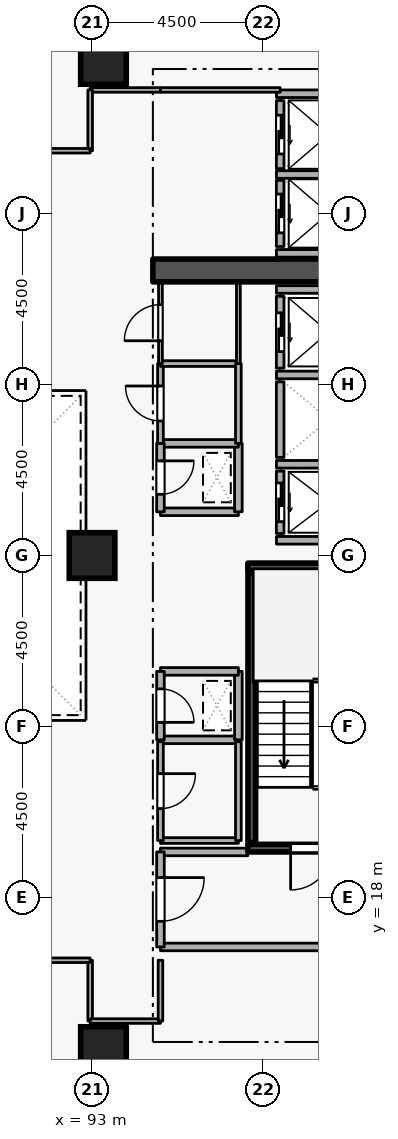
"""IFC4 building model, lengths in metres.
Left out: names, types, materials, properties, quantities, classifications, styles, units other than length and angle.
Written with IfcOpenShell. Run it as: python <this file> out.ifc"""

import sys

from ifc_helpers import new_model, si_unit, direction, frame, frame_2d, origin, origin_2d, place, context, subcontext, project, spatial, rectangle, extrude, element, fill, save


model = new_model("IFC4")
c1 = context("Model", 3, precision=1e-05, world=origin(), true_north=direction((0.0, 1.0)))
c2 = subcontext(c1, "Body", "Model", "MODEL_VIEW")
j1 = project(units=[si_unit("LENGTHUNIT", "METRE"), si_unit("PLANEANGLEUNIT", "RADIAN")], contexts=[c1])
p1 = place(None, origin())
s1 = spatial("IfcSite", under=j1, at=p1, CompositionType="ELEMENT")
p2 = place(p1, origin())
s2 = spatial("IfcBuilding", under=s1, at=p2, CompositionType="ELEMENT")
p3 = place(p2, frame((0.0, 0.0, 80.1)))
s3 = spatial("IfcBuildingStorey", under=s2, at=p3, CompositionType="ELEMENT", Elevation=80.1)
p4 = place(p3, frame((94.6, 34.5, 0.0), z_axis=(0.0, 0.0, 1.0), x_axis=(1.0, 0.0, 0.0)))
e1 = element("IfcWall", 1, at=p4, inside=s3, PredefinedType="SHEAR", context=c2, shape_type="SweptSolid", body=[
    extrude(rectangle(XDim=5.7, YDim=0.6, at=frame_2d((2.85, 0.0))), origin(), (0.0, 0.0, 1.0), 3.6),
])
for number, where, z_axis, x_axis in (
    (2, (93.3, 14.0, 0.0), (0.0, 0.0, 1.0), (1.0, 0.0, 0.0)),
    (3, (93.3, 40.0, 0.0), (0.0, 0.0, 1.0), (1.0, 0.0, 0.0)),
    (4, (93.0, 27.0, 0.0), (0.0, 0.0, 1.0), (1.0, 0.0, 0.0)),
):
    element("IfcColumn", number, at=place(p3, frame(where, z_axis=z_axis, x_axis=x_axis)), inside=s3, PredefinedType="COLUMN", context=c2, shape_type="SweptSolid", body=[
        extrude(rectangle(XDim=1.2, YDim=1.2, at=origin_2d()), origin(), (0.0, 0.0, 1.0), 3.6),
    ])
p5 = place(p3, frame((97.95, 29.22, 0.0), z_axis=(0.0, 0.0, 1.0), x_axis=(0.0, -1.0, 0.0)))
e5 = element("IfcWall", 5, at=p5, inside=s3, PredefinedType="STANDARD", context=c2, shape_type="SweptSolid", body=[
    extrude(rectangle(XDim=1.64, YDim=0.2, at=frame_2d((0.82, 0.0))), origin(), (0.0, 0.0, 1.0), 3.34),
])
p6 = place(p5, frame((0.31, 0.0, 0.0)))
e6 = element("IfcOpeningElement", 6, at=p6, cuts=e5, PredefinedType="OPENING", context=c2, shape_type="SweptSolid", body=[
    extrude(rectangle(XDim=1.02, YDim=2.06, at=frame_2d((0.51, 1.03))), frame((0.0, 0.11, 0.0), z_axis=(0.0, -1.0, 0.0), x_axis=(1.0, 0.0, 0.0)), (0.0, 0.0, 1.0), 0.22),
])
p7 = place(p3, frame((97.95, 31.57, 0.0), z_axis=(0.0, 0.0, 1.0), x_axis=(0.0, -1.0, 0.0)))
e7 = element("IfcWall", 7, at=p7, inside=s3, PredefinedType="STANDARD", context=c2, shape_type="SweptSolid", body=[
    extrude(rectangle(XDim=1.99, YDim=0.2, at=frame_2d((0.995, 0.0))), origin(), (0.0, 0.0, 1.0), 3.34),
])
p8 = place(p3, frame((97.95, 33.82, 0.0), z_axis=(0.0, 0.0, 1.0), x_axis=(0.0, -1.0, 0.0)))
e8 = element("IfcWall", 8, at=p8, inside=s3, PredefinedType="STANDARD", context=c2, shape_type="SweptSolid", body=[
    extrude(rectangle(XDim=1.89, YDim=0.2, at=frame_2d((0.945, 0.0))), origin(), (0.0, 0.0, 1.0), 3.34),
])
p9 = place(p8, frame((0.435, 0.0, 0.0)))
e9 = element("IfcOpeningElement", 9, at=p9, cuts=e8, PredefinedType="OPENING", context=c2, shape_type="SweptSolid", body=[
    extrude(rectangle(XDim=1.02, YDim=2.06, at=frame_2d((0.51, 1.03))), frame((0.0, 0.11, 0.0), z_axis=(0.0, -1.0, 0.0), x_axis=(1.0, 0.0, 0.0)), (0.0, 0.0, 1.0), 0.22),
])
p10 = place(p3, frame((97.95, 36.87, 0.0), z_axis=(0.0, 0.0, 1.0), x_axis=(0.0, -1.0, 0.0)))
e10 = element("IfcWall", 10, at=p10, inside=s3, PredefinedType="STANDARD", context=c2, shape_type="SweptSolid", body=[
    extrude(rectangle(XDim=1.74, YDim=0.2, at=frame_2d((0.87, 0.0))), origin(), (0.0, 0.0, 1.0), 3.34),
])
p11 = place(p10, frame((0.36, 0.0, 0.0)))
e11 = element("IfcOpeningElement", 11, at=p11, cuts=e10, PredefinedType="OPENING", context=c2, shape_type="SweptSolid", body=[
    extrude(rectangle(XDim=1.02, YDim=2.06, at=frame_2d((0.51, 1.03))), frame((0.0, 0.11, 0.0), z_axis=(0.0, -1.0, 0.0), x_axis=(1.0, 0.0, 0.0)), (0.0, 0.0, 1.0), 0.22),
])
p12 = place(p3, frame((97.95, 38.97, 0.0), z_axis=(0.0, 0.0, 1.0), x_axis=(0.0, -1.0, 0.0)))
e12 = element("IfcWall", 12, at=p12, inside=s3, PredefinedType="STANDARD", context=c2, shape_type="SweptSolid", body=[
    extrude(rectangle(XDim=1.79, YDim=0.2, at=frame_2d((0.895, 0.0))), origin(), (0.0, 0.0, 1.0), 3.34),
])
p13 = place(p12, frame((0.385, 0.0, 0.0)))
e13 = element("IfcOpeningElement", 13, at=p13, cuts=e12, PredefinedType="OPENING", context=c2, shape_type="SweptSolid", body=[
    extrude(rectangle(XDim=1.02, YDim=2.06, at=frame_2d((0.51, 1.03))), frame((0.0, 0.11, 0.0), z_axis=(0.0, -1.0, 0.0), x_axis=(1.0, 0.0, 0.0)), (0.0, 0.0, 1.0), 0.22),
])
for number, where, z_axis, x_axis in (
    (14, (97.852, 29.4, 0.0), (0.0, 0.0, 1.0), (1.0, 0.0, 0.0)),
    (15, (97.852, 27.4, 0.0), (0.0, 0.0, 1.0), (1.0, 0.0, 0.0)),
    (16, (97.852, 31.75, 0.0), (0.0, 0.0, 1.0), (1.0, 0.0, 0.0)),
    (17, (97.852, 34.0, 0.0), (0.0, 0.0, 1.0), (1.0, 0.0, 0.0)),
):
    element("IfcWall", number, at=place(p3, frame(where, z_axis=z_axis, x_axis=x_axis)), inside=s3, PredefinedType="STANDARD", context=c2, shape_type="SweptSolid", body=[
        extrude(rectangle(XDim=2.436, YDim=0.2, at=frame_2d((1.218, 0.0))), origin(), (0.0, 0.0, 1.0), 3.34),
    ])
for number, where, z_axis, x_axis in (
    (18, (97.852, 37.025, 0.0), (0.0, 0.0, 1.0), (1.0, 0.0, 0.0)),
    (19, (97.852, 34.95, 0.0), (0.0, 0.0, 1.0), (1.0, 0.0, 0.0)),
):
    element("IfcWall", number, at=place(p3, frame(where, z_axis=z_axis, x_axis=x_axis)), inside=s3, PredefinedType="STANDARD", context=c2, shape_type="SweptSolid", body=[
        extrude(rectangle(XDim=2.746, YDim=0.2, at=frame_2d((1.373, 0.0))), origin(), (0.0, 0.0, 1.0), 3.34),
    ])
p14 = place(p3, frame((97.852, 39.15, 0.0), z_axis=(0.0, 0.0, 1.0), x_axis=(1.0, 0.0, 0.0)))
e20 = element("IfcWall", 20, at=p14, inside=s3, PredefinedType="STANDARD", context=c2, shape_type="SweptSolid", body=[
    extrude(rectangle(XDim=2.636, YDim=0.2, at=frame_2d((1.318, 0.0))), origin(), (0.0, 0.0, 1.0), 3.34),
])
p15 = place(p3, frame((100.45, 19.3, 0.0), z_axis=(0.0, 0.0, 1.0), x_axis=(-1.0, 0.0, 0.0)))
e21 = element("IfcWall", 21, at=p15, inside=s3, PredefinedType="SHEAR", context=c2, shape_type="SweptSolid", body=[
    extrude(rectangle(XDim=3.35, YDim=0.2, at=frame_2d((1.675, 0.0))), origin(), (0.0, 0.0, 1.0), 3.6),
])
p16 = place(p15, frame((1.125, 0.0, 0.0)))
e22 = element("IfcOpeningElement", 22, at=p16, cuts=e21, PredefinedType="OPENING", context=c2, shape_type="SweptSolid", body=[
    extrude(rectangle(XDim=1.1, YDim=2.1, at=frame_2d((0.55, 1.05))), frame((0.0, 0.11, 0.0), z_axis=(0.0, -1.0, 0.0), x_axis=(1.0, 0.0, 0.0)), (0.0, 0.0, 1.0), 0.22),
])
p17 = place(p3, frame((97.1, 26.7, 0.0), z_axis=(0.0, 0.0, 1.0), x_axis=(1.0, 0.0, 0.0)))
e23 = element("IfcWall", 23, at=p17, inside=s3, PredefinedType="SHEAR", context=c2, shape_type="SweptSolid", body=[
    extrude(rectangle(XDim=3.35, YDim=0.2, at=frame_2d((1.675, 0.0))), origin(), (0.0, 0.0, 1.0), 3.6),
])
p18 = place(p3, frame((97.203, 26.55, 0.0), z_axis=(0.0, 0.0, 1.0), x_axis=(0.0, -1.0, 0.0)))
e24 = element("IfcWall", 24, at=p18, inside=s3, PredefinedType="SHEAR", context=c2, shape_type="SweptSolid", body=[
    extrude(rectangle(XDim=7.1, YDim=0.2, at=frame_2d((3.55, 0.0))), origin(), (0.0, 0.0, 1.0), 3.6),
])
p19 = place(p3, frame((94.8, 16.7, 0.0), z_axis=(0.0, 0.0, 1.0), x_axis=(1.0, 0.0, 0.0)))
e25 = element("IfcWall", 25, at=p19, inside=s3, PredefinedType="STANDARD", context=c2, shape_type="SweptSolid", body=[
    extrude(rectangle(XDim=5.7, YDim=0.2, at=frame_2d((2.85, 0.0))), origin(), (0.0, 0.0, 1.0), 3.34),
])
p20 = place(p3, frame((97.1, 19.2, 0.0), z_axis=(0.0, 0.0, 1.0), x_axis=(-1.0, 0.0, 0.0)))
e26 = element("IfcWall", 26, at=p20, inside=s3, PredefinedType="STANDARD", context=c2, shape_type="SweptSolid", body=[
    extrude(rectangle(XDim=2.3, YDim=0.2, at=frame_2d((1.15, 0.0))), origin(), (0.0, 0.0, 1.0), 2.545),
])
p21 = place(p3, frame((94.8, 19.2, 0.0), z_axis=(0.0, 0.0, 1.0), x_axis=(0.0, -1.0, 0.0)))
e27 = element("IfcWall", 27, at=p21, inside=s3, PredefinedType="STANDARD", context=c2, shape_type="SweptSolid", body=[
    extrude(rectangle(XDim=2.5, YDim=0.2, at=frame_2d((1.25, 0.0))), origin(), (0.0, 0.0, 1.0), 3.34),
])
p22 = place(p21, frame((0.675, 0.0, 0.0)))
e28 = element("IfcOpeningElement", 28, at=p22, cuts=e27, PredefinedType="OPENING", context=c2, shape_type="SweptSolid", body=[
    extrude(rectangle(XDim=1.15, YDim=2.1, at=frame_2d((0.575, 1.05))), frame((0.0, 0.11, 0.0), z_axis=(0.0, -1.0, 0.0), x_axis=(1.0, 0.0, 0.0)), (0.0, 0.0, 1.0), 0.22),
])
p23 = place(p3, frame((94.8, 28.15, 0.0), z_axis=(0.0, 0.0, 1.0), x_axis=(1.0, 0.0, 0.0)))
e29 = element("IfcWall", 29, at=p23, inside=s3, PredefinedType="STANDARD", context=c2, shape_type="SweptSolid", body=[
    extrude(rectangle(XDim=2.05, YDim=0.2, at=frame_2d((1.025, 0.0))), origin(), (0.0, 0.0, 1.0), 3.34),
])
p24 = place(p3, frame((96.85, 28.15, 0.0), z_axis=(0.0, 0.0, 1.0), x_axis=(0.0, 1.0, 0.0)))
e30 = element("IfcWall", 30, at=p24, inside=s3, PredefinedType="STANDARD", context=c2, shape_type="SweptSolid", body=[
    extrude(rectangle(XDim=1.8, YDim=0.2, at=frame_2d((0.9, 0.0))), origin(), (0.0, 0.0, 1.0), 3.34),
])
p25 = place(p3, frame((96.85, 29.95, 0.0), z_axis=(0.0, 0.0, 1.0), x_axis=(-1.0, 0.0, 0.0)))
e31 = element("IfcWall", 31, at=p25, inside=s3, PredefinedType="STANDARD", context=c2, shape_type="SweptSolid", body=[
    extrude(rectangle(XDim=2.05, YDim=0.2, at=frame_2d((1.025, 0.0))), origin(), (0.0, 0.0, 1.0), 3.34),
])
p26 = place(p3, frame((94.8, 29.95, 0.0), z_axis=(0.0, 0.0, 1.0), x_axis=(0.0, -1.0, 0.0)))
e32 = element("IfcWall", 32, at=p26, inside=s3, PredefinedType="STANDARD", context=c2, shape_type="SweptSolid", body=[
    extrude(rectangle(XDim=1.8, YDim=0.2, at=frame_2d((0.9, 0.0))), origin(), (0.0, 0.0, 1.0), 3.34),
])
p27 = place(p26, frame((0.46, 0.0, 0.0)))
e33 = element("IfcOpeningElement", 33, at=p27, cuts=e32, PredefinedType="OPENING", context=c2, shape_type="SweptSolid", body=[
    extrude(rectangle(XDim=0.88, YDim=2.04, at=frame_2d((0.44, 1.02))), frame((0.0, 0.11, 0.0), z_axis=(0.0, -1.0, 0.0), x_axis=(1.0, 0.0, 0.0)), (0.0, 0.0, 1.0), 0.22),
])
p28 = place(p3, frame((94.8, 22.15, 0.0), z_axis=(0.0, 0.0, 1.0), x_axis=(1.0, 0.0, 0.0)))
e34 = element("IfcWall", 34, at=p28, inside=s3, PredefinedType="STANDARD", context=c2, shape_type="SweptSolid", body=[
    extrude(rectangle(XDim=2.05, YDim=0.2, at=frame_2d((1.025, 0.0))), origin(), (0.0, 0.0, 1.0), 3.34),
])
p29 = place(p3, frame((96.85, 22.15, 0.0), z_axis=(0.0, 0.0, 1.0), x_axis=(0.0, 1.0, 0.0)))
e35 = element("IfcWall", 35, at=p29, inside=s3, PredefinedType="STANDARD", context=c2, shape_type="SweptSolid", body=[
    extrude(rectangle(XDim=1.8, YDim=0.2, at=frame_2d((0.9, 0.0))), origin(), (0.0, 0.0, 1.0), 3.34),
])
p30 = place(p3, frame((96.85, 23.95, 0.0), z_axis=(0.0, 0.0, 1.0), x_axis=(-1.0, 0.0, 0.0)))
e36 = element("IfcWall", 36, at=p30, inside=s3, PredefinedType="STANDARD", context=c2, shape_type="SweptSolid", body=[
    extrude(rectangle(XDim=2.05, YDim=0.2, at=frame_2d((1.025, 0.0))), origin(), (0.0, 0.0, 1.0), 3.34),
])
p31 = place(p3, frame((94.8, 23.95, 0.0), z_axis=(0.0, 0.0, 1.0), x_axis=(0.0, -1.0, 0.0)))
e37 = element("IfcWall", 37, at=p31, inside=s3, PredefinedType="STANDARD", context=c2, shape_type="SweptSolid", body=[
    extrude(rectangle(XDim=1.8, YDim=0.2, at=frame_2d((0.9, 0.0))), origin(), (0.0, 0.0, 1.0), 3.34),
])
p32 = place(p31, frame((0.46, 0.0, 0.0)))
e38 = element("IfcOpeningElement", 38, at=p32, cuts=e37, PredefinedType="OPENING", context=c2, shape_type="SweptSolid", body=[
    extrude(rectangle(XDim=0.88, YDim=2.04, at=frame_2d((0.44, 1.02))), frame((0.0, 0.11, 0.0), z_axis=(0.0, -1.0, 0.0), x_axis=(1.0, 0.0, 0.0)), (0.0, 0.0, 1.0), 0.22),
])
p33 = place(p3, frame((94.8, 19.5, 0.0), z_axis=(0.0, 0.0, 1.0), x_axis=(1.0, 0.0, 0.0)))
e39 = element("IfcWall", 39, at=p33, inside=s3, PredefinedType="PARTITIONING", context=c2, shape_type="SweptSolid", body=[
    extrude(rectangle(XDim=2.05, YDim=0.15, at=frame_2d((1.025, 0.0))), origin(), (0.0, 0.0, 1.0), 2.545),
])
p34 = place(p3, frame((96.85, 19.5, 0.0), z_axis=(0.0, 0.0, 1.0), x_axis=(0.0, 1.0, 0.0)))
e40 = element("IfcWall", 40, at=p34, inside=s3, PredefinedType="PARTITIONING", context=c2, shape_type="SweptSolid", body=[
    extrude(rectangle(XDim=2.6, YDim=0.15, at=frame_2d((1.3, 0.0))), origin(), (0.0, 0.0, 1.0), 3.34),
])
p35 = place(p3, frame((94.8, 22.1, 0.0), z_axis=(0.0, 0.0, 1.0), x_axis=(0.0, -1.0, 0.0)))
e41 = element("IfcWall", 41, at=p35, inside=s3, PredefinedType="PARTITIONING", context=c2, shape_type="SweptSolid", body=[
    extrude(rectangle(XDim=2.6, YDim=0.15, at=frame_2d((1.3, 0.0))), origin(), (0.0, 0.0, 1.0), 3.34),
])
p36 = place(p35, frame((0.84, 0.0, 0.0)))
e42 = element("IfcOpeningElement", 42, at=p36, cuts=e41, PredefinedType="OPENING", context=c2, shape_type="SweptSolid", body=[
    extrude(rectangle(XDim=0.92, YDim=2.08, at=frame_2d((0.46, 1.04))), frame((0.0, 0.085, 0.0), z_axis=(0.0, -1.0, 0.0), x_axis=(1.0, 0.0, 0.0)), (0.0, 0.0, 1.0), 0.17),
])
p37 = place(p3, frame((94.8, 29.95, 0.0), z_axis=(0.0, 0.0, 1.0), x_axis=(0.0, 1.0, 0.0)))
e43 = element("IfcWall", 43, at=p37, inside=s3, PredefinedType="PARTITIONING", context=c2, shape_type="SweptSolid", body=[
    extrude(rectangle(XDim=2.1, YDim=0.15, at=frame_2d((1.05, 0.0))), origin(), (0.0, 0.0, 1.0), 3.34),
])
p38 = place(p37, frame((0.59, 0.0, 0.0)))
e44 = element("IfcOpeningElement", 44, at=p38, cuts=e43, PredefinedType="OPENING", context=c2, shape_type="SweptSolid", body=[
    extrude(rectangle(XDim=0.92, YDim=2.08, at=frame_2d((0.46, 1.04))), frame((0.0, 0.085, 0.0), z_axis=(0.0, -1.0, 0.0), x_axis=(1.0, 0.0, 0.0)), (0.0, 0.0, 1.0), 0.17),
])
p39 = place(p3, frame((94.8, 32.05, 0.0), z_axis=(0.0, 0.0, 1.0), x_axis=(1.0, 0.0, 0.0)))
e45 = element("IfcWall", 45, at=p39, inside=s3, PredefinedType="PARTITIONING", context=c2, shape_type="SweptSolid", body=[
    extrude(rectangle(XDim=2.05, YDim=0.15, at=frame_2d((1.025, 0.0))), origin(), (0.0, 0.0, 1.0), 3.34),
])
p40 = place(p3, frame((96.85, 32.05, 0.0), z_axis=(0.0, 0.0, 1.0), x_axis=(0.0, -1.0, 0.0)))
e46 = element("IfcWall", 46, at=p40, inside=s3, PredefinedType="PARTITIONING", context=c2, shape_type="SweptSolid", body=[
    extrude(rectangle(XDim=2.1, YDim=0.15, at=frame_2d((1.05, 0.0))), origin(), (0.0, 0.0, 1.0), 3.34),
])
p41 = place(p3, frame((94.8, 32.05, 0.0), z_axis=(0.0, 0.0, 1.0), x_axis=(0.0, 1.0, 0.0)))
e47 = element("IfcWall", 47, at=p41, inside=s3, PredefinedType="PARTITIONING", context=c2, shape_type="SweptSolid", body=[
    extrude(rectangle(XDim=2.15, YDim=0.1, at=frame_2d((1.075, 0.0))), origin(), (0.0, 0.0, 1.0), 3.34),
])
p42 = place(p41, frame((0.6, 0.0, 0.0)))
e48 = element("IfcOpeningElement", 48, at=p42, cuts=e47, PredefinedType="OPENING", context=c2, shape_type="SweptSolid", body=[
    extrude(rectangle(XDim=0.95, YDim=2.1, at=frame_2d((0.475, 1.05))), frame((0.0, 0.06, 0.0), z_axis=(0.0, -1.0, 0.0), x_axis=(1.0, 0.0, 0.0)), (0.0, 0.0, 1.0), 0.12),
])
p43 = place(p3, frame((96.85, 34.2, 0.0), z_axis=(0.0, 0.0, 1.0), x_axis=(0.0, -1.0, 0.0)))
e49 = element("IfcWall", 49, at=p43, inside=s3, PredefinedType="PARTITIONING", context=c2, shape_type="SweptSolid", body=[
    extrude(rectangle(XDim=2.15, YDim=0.1, at=frame_2d((1.075, 0.0))), origin(), (0.0, 0.0, 1.0), 3.34),
])
p44 = place(p3, frame((92.95, 16.35, 0.0), z_axis=(0.0, 0.0, 1.0), x_axis=(0.0, -1.0, 0.0)))
e50 = element("IfcWall", 50, at=p44, inside=s3, PredefinedType="PARTITIONING", context=c2, shape_type="SweptSolid", body=[
    extrude(rectangle(XDim=1.6, YDim=0.12, at=frame_2d((0.8, 0.0))), origin(), (0.0, 0.0, 1.0), 3.34),
])
p45 = place(p3, frame((92.95, 14.75, 0.0), z_axis=(0.0, 0.0, 1.0), x_axis=(1.0, 0.0, 0.0)))
e51 = element("IfcWall", 51, at=p45, inside=s3, PredefinedType="PARTITIONING", context=c2, shape_type="SweptSolid", body=[
    extrude(rectangle(XDim=1.85, YDim=0.12, at=frame_2d((0.925, 0.0))), origin(), (0.0, 0.0, 1.0), 3.34),
])
p46 = place(p3, frame((94.8, 14.75, 0.0), z_axis=(0.0, 0.0, 1.0), x_axis=(0.0, 1.0, 0.0)))
e52 = element("IfcWall", 52, at=p46, inside=s3, PredefinedType="PARTITIONING", context=c2, shape_type="SweptSolid", body=[
    extrude(rectangle(XDim=1.6, YDim=0.12, at=frame_2d((0.8, 0.0))), origin(), (0.0, 0.0, 1.0), 3.34),
])
p47 = place(p3, frame((88.5, 16.35, 0.0), z_axis=(0.0, 0.0, 1.0), x_axis=(1.0, 0.0, 0.0)))
e53 = element("IfcWall", 53, at=p47, inside=s3, PredefinedType="PARTITIONING", context=c2, shape_type="SweptSolid", body=[
    extrude(rectangle(XDim=4.45, YDim=0.12, at=frame_2d((2.225, 0.0))), origin(), (0.0, 0.0, 1.0), 3.34),
])
p48 = place(p47, frame((1.7, 0.0, 0.0)))
e54 = element("IfcOpeningElement", 54, at=p48, cuts=e53, PredefinedType="OPENING", context=c2, shape_type="SweptSolid", body=[
    extrude(rectangle(XDim=1.05, YDim=2.1, at=frame_2d((0.525, 1.05))), frame((0.0, 0.07, 0.0), z_axis=(0.0, -1.0, 0.0), x_axis=(1.0, 0.0, 0.0)), (0.0, 0.0, 1.0), 0.14),
])
p49 = place(p3, frame((97.95, 39.25, 0.0), z_axis=(0.0, 0.0, 1.0), x_axis=(-1.0, 0.0, 0.0)))
e55 = element("IfcWall", 55, at=p49, inside=s3, PredefinedType="PARTITIONING", context=c2, shape_type="SweptSolid", body=[
    extrude(rectangle(XDim=3.15, YDim=0.12, at=frame_2d((1.575, 0.0))), origin(), (0.0, 0.0, 1.0), 3.34),
])
p50 = place(p3, frame((94.8, 39.25, 0.0), z_axis=(0.0, 0.0, 1.0), x_axis=(-1.0, 0.0, 0.0)))
e56 = element("IfcWall", 56, at=p50, inside=s3, PredefinedType="PARTITIONING", context=c2, shape_type="SweptSolid", body=[
    extrude(rectangle(XDim=1.85, YDim=0.12, at=frame_2d((0.925, 0.0))), origin(), (0.0, 0.0, 1.0), 3.34),
])
p51 = place(p3, frame((92.95, 39.25, 0.0), z_axis=(0.0, 0.0, 1.0), x_axis=(0.0, -1.0, 0.0)))
e57 = element("IfcWall", 57, at=p51, inside=s3, PredefinedType="PARTITIONING", context=c2, shape_type="SweptSolid", body=[
    extrude(rectangle(XDim=1.6, YDim=0.12, at=frame_2d((0.8, 0.0))), origin(), (0.0, 0.0, 1.0), 3.34),
])
p52 = place(p3, frame((92.95, 37.65, 0.0), z_axis=(0.0, 0.0, 1.0), x_axis=(-1.0, 0.0, 0.0)))
e58 = element("IfcWall", 58, at=p52, inside=s3, PredefinedType="PARTITIONING", context=c2, shape_type="SweptSolid", body=[
    extrude(rectangle(XDim=4.45, YDim=0.12, at=frame_2d((2.225, 0.0))), origin(), (0.0, 0.0, 1.0), 3.34),
])
p53 = place(p52, frame((1.7, 0.0, 0.0)))
e59 = element("IfcOpeningElement", 59, at=p53, cuts=e58, PredefinedType="OPENING", context=c2, shape_type="SweptSolid", body=[
    extrude(rectangle(XDim=1.05, YDim=2.1, at=frame_2d((0.525, 1.05))), frame((0.0, 0.07, 0.0), z_axis=(0.0, -1.0, 0.0), x_axis=(1.0, 0.0, 0.0)), (0.0, 0.0, 1.0), 0.14),
])
p54 = place(p6, origin())
e60 = element("IfcDoor", 60, at=p54, inside=s3, OperationType="SLIDING_TO_LEFT", PredefinedType="DOOR", context=c2, shape_type="SweptSolid", body=[
    extrude(rectangle(XDim=1.02, YDim=2.06, at=frame_2d((0.51, 1.03))), frame((0.0, 0.025, 0.0), z_axis=(0.0, -1.0, 0.0), x_axis=(1.0, 0.0, 0.0)), (0.0, 0.0, 1.0), 0.05),
])
fill(e6, e60)
p55 = place(p9, origin())
e61 = element("IfcDoor", 61, at=p55, inside=s3, OperationType="SLIDING_TO_LEFT", PredefinedType="DOOR", context=c2, shape_type="SweptSolid", body=[
    extrude(rectangle(XDim=1.02, YDim=2.06, at=frame_2d((0.51, 1.03))), frame((0.0, 0.025, 0.0), z_axis=(0.0, -1.0, 0.0), x_axis=(1.0, 0.0, 0.0)), (0.0, 0.0, 1.0), 0.05),
])
fill(e9, e61)
p56 = place(p11, origin())
e62 = element("IfcDoor", 62, at=p56, inside=s3, OperationType="SLIDING_TO_LEFT", PredefinedType="DOOR", context=c2, shape_type="SweptSolid", body=[
    extrude(rectangle(XDim=1.02, YDim=2.06, at=frame_2d((0.51, 1.03))), frame((0.0, 0.025, 0.0), z_axis=(0.0, -1.0, 0.0), x_axis=(1.0, 0.0, 0.0)), (0.0, 0.0, 1.0), 0.05),
])
fill(e11, e62)
p57 = place(p13, origin())
e63 = element("IfcDoor", 63, at=p57, inside=s3, OperationType="SLIDING_TO_LEFT", PredefinedType="DOOR", context=c2, shape_type="SweptSolid", body=[
    extrude(rectangle(XDim=1.02, YDim=2.06, at=frame_2d((0.51, 1.03))), frame((0.0, 0.025, 0.0), z_axis=(0.0, -1.0, 0.0), x_axis=(1.0, 0.0, 0.0)), (0.0, 0.0, 1.0), 0.05),
])
fill(e13, e63)
p58 = place(p16, origin())
e64 = element("IfcDoor", 64, at=p58, inside=s3, OperationType="SINGLE_SWING_RIGHT", PredefinedType="DOOR", context=c2, shape_type="SweptSolid", body=[
    extrude(rectangle(XDim=1.1, YDim=2.1, at=frame_2d((0.55, 1.05))), frame((0.0, 0.025, 0.0), z_axis=(0.0, -1.0, 0.0), x_axis=(1.0, 0.0, 0.0)), (0.0, 0.0, 1.0), 0.05),
])
fill(e22, e64)
p59 = place(p22, origin())
e65 = element("IfcDoor", 65, at=p59, inside=s3, OperationType="SINGLE_SWING_LEFT", PredefinedType="DOOR", context=c2, shape_type="SweptSolid", body=[
    extrude(rectangle(XDim=1.15, YDim=2.1, at=frame_2d((0.575, 1.05))), frame((0.0, 0.025, 0.0), z_axis=(0.0, -1.0, 0.0), x_axis=(1.0, 0.0, 0.0)), (0.0, 0.0, 1.0), 0.05),
])
fill(e28, e65)
p60 = place(p27, origin())
e66 = element("IfcDoor", 66, at=p60, inside=s3, OperationType="SINGLE_SWING_LEFT", PredefinedType="DOOR", context=c2, shape_type="SweptSolid", body=[
    extrude(rectangle(XDim=0.88, YDim=2.04, at=frame_2d((0.44, 1.02))), frame((0.0, 0.025, 0.0), z_axis=(0.0, -1.0, 0.0), x_axis=(1.0, 0.0, 0.0)), (0.0, 0.0, 1.0), 0.05),
])
fill(e33, e66)
p61 = place(p32, origin())
e67 = element("IfcDoor", 67, at=p61, inside=s3, OperationType="SINGLE_SWING_RIGHT", PredefinedType="DOOR", context=c2, shape_type="SweptSolid", body=[
    extrude(rectangle(XDim=0.88, YDim=2.04, at=frame_2d((0.44, 1.02))), frame((0.0, 0.025, 0.0), z_axis=(0.0, -1.0, 0.0), x_axis=(1.0, 0.0, 0.0)), (0.0, 0.0, 1.0), 0.05),
])
fill(e38, e67)
p62 = place(p36, origin())
e68 = element("IfcDoor", 68, at=p62, inside=s3, OperationType="SINGLE_SWING_LEFT", PredefinedType="DOOR", context=c2, shape_type="SweptSolid", body=[
    extrude(rectangle(XDim=0.92, YDim=2.08, at=frame_2d((0.46, 1.04))), frame((0.0, 0.025, 0.0), z_axis=(0.0, -1.0, 0.0), x_axis=(1.0, 0.0, 0.0)), (0.0, 0.0, 1.0), 0.05),
])
fill(e42, e68)
p63 = place(p38, origin())
e69 = element("IfcDoor", 69, at=p63, inside=s3, OperationType="SINGLE_SWING_RIGHT", PredefinedType="DOOR", context=c2, shape_type="SweptSolid", body=[
    extrude(rectangle(XDim=0.92, YDim=2.08, at=frame_2d((0.46, 1.04))), frame((0.0, 0.025, 0.0), z_axis=(0.0, -1.0, 0.0), x_axis=(1.0, 0.0, 0.0)), (0.0, 0.0, 1.0), 0.05),
])
fill(e44, e69)
p64 = place(p42, origin())
e70 = element("IfcDoor", 70, at=p64, inside=s3, OperationType="SINGLE_SWING_LEFT", PredefinedType="DOOR", context=c2, shape_type="SweptSolid", body=[
    extrude(rectangle(XDim=0.95, YDim=2.1, at=frame_2d((0.475, 1.05))), frame((0.0, 0.025, 0.0), z_axis=(0.0, -1.0, 0.0), x_axis=(1.0, 0.0, 0.0)), (0.0, 0.0, 1.0), 0.05),
])
fill(e48, e70)
save(model, sys.argv[1])
